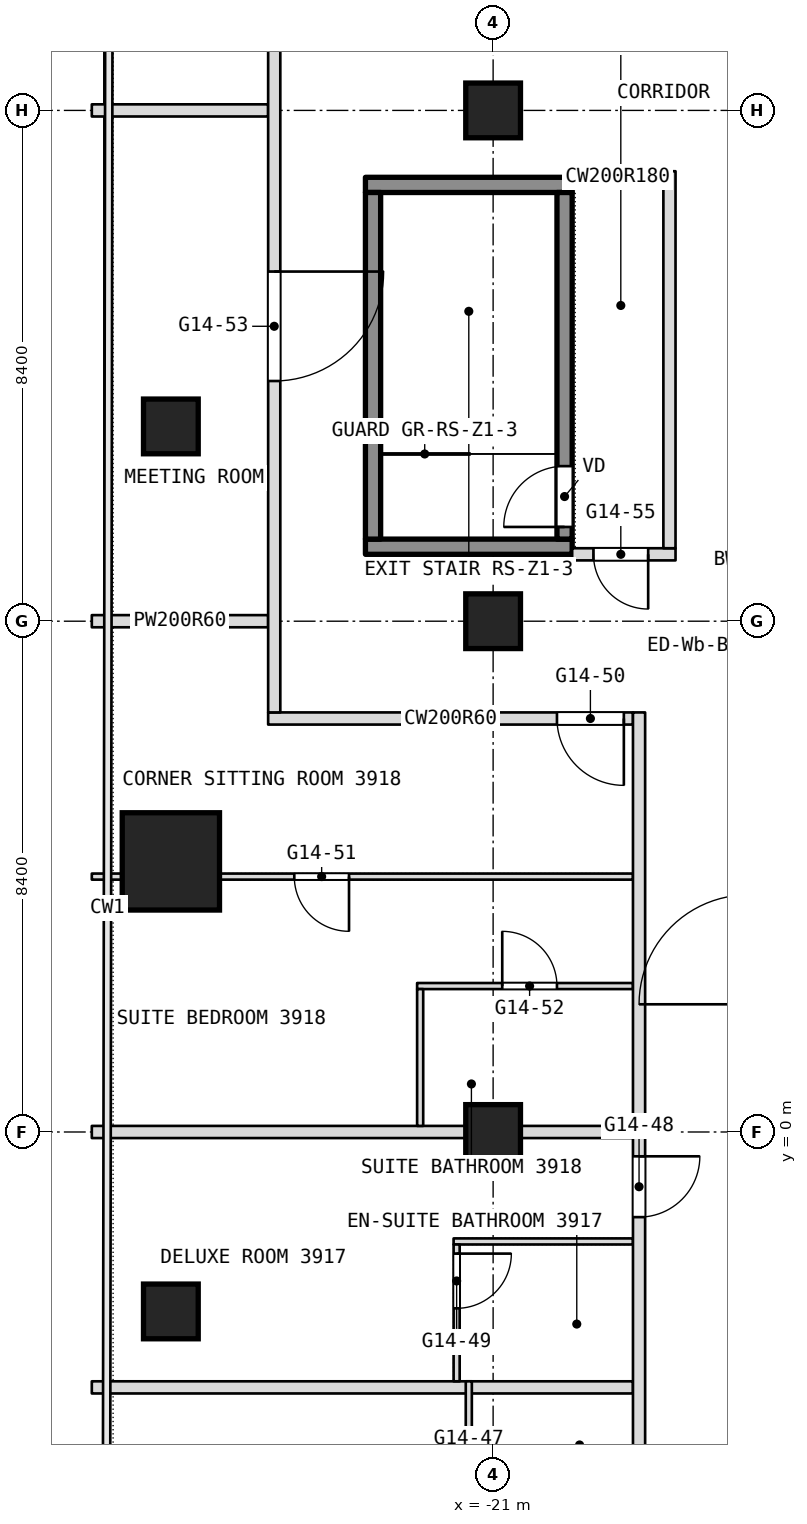
"""IFC4 building model, lengths in metres.
Left out: names, types, materials, properties, quantities, classifications, styles, units other than length and angle.
Written with IfcOpenShell. Run it as: python <this file> out.ifc"""

import sys

from ifc_helpers import new_model, si_unit, direction, frame, frame_2d, origin, origin_2d, place, context, subcontext, project, spatial, rectangle, extrude, element, fill, save


model = new_model("IFC4")
c1 = context("Model", 3, precision=1e-05, world=origin(), true_north=direction((0.0, 1.0)))
c2 = subcontext(c1, "Body", "Model", "MODEL_VIEW")
j1 = project(units=[si_unit("LENGTHUNIT", "METRE"), si_unit("PLANEANGLEUNIT", "RADIAN")], contexts=[c1])
p1 = place(None, origin())
s1 = spatial("IfcSite", under=j1, at=p1, CompositionType="ELEMENT")
p2 = place(p1, origin())
s2 = spatial("IfcBuilding", under=s1, at=p2, CompositionType="ELEMENT")
p3 = place(p2, frame((0.0, 0.0, 166.1)))
s3 = spatial("IfcBuildingStorey", under=s2, at=p3, CompositionType="ELEMENT", Elevation=166.1)
p4 = place(p3, frame((-26.3, 4.45, 0.0), z_axis=(0.0, 0.0, 1.0), x_axis=(1.0, 0.0, 0.0)))
e1 = element("IfcColumn", 1, at=p4, inside=s3, PredefinedType="COLUMN", context=c2, shape_type="SweptSolid", body=[
    extrude(rectangle(XDim=1.6, YDim=1.6, at=origin_2d()), origin(), (0.0, 0.0, 1.0), 3.6),
])
for number, where, z_axis, x_axis in (
    (2, (-21.0, 0.0, 0.0), (0.0, 0.0, 1.0), (1.0, 0.0, 0.0)),
    (3, (-21.0, 8.4, 0.0), (0.0, 0.0, 1.0), (1.0, 0.0, 0.0)),
    (4, (-21.0, 16.8, 0.0), (0.0, 0.0, 1.0), (1.0, 0.0, 0.0)),
    (5, (-26.3, -2.951, 0.0), (0.0, 0.0, 1.0), (1.0, 0.0, 0.0)),
    (6, (-26.3, 11.603, 0.0), (0.0, 0.0, 1.0), (1.0, 0.0, 0.0)),
):
    element("IfcColumn", number, at=place(p3, frame(where, z_axis=z_axis, x_axis=x_axis)), inside=s3, PredefinedType="COLUMN", context=c2, shape_type="SweptSolid", body=[
        extrude(rectangle(XDim=0.9, YDim=0.9, at=origin_2d()), origin(), (0.0, 0.0, 1.0), 3.6),
    ])
p5 = place(p3, frame((-27.6, -4.2, 0.0), z_axis=(0.0, 0.0, 1.0), x_axis=(1.0, 0.0, 0.0)))
e7 = element("IfcWall", 7, at=p5, inside=s3, PredefinedType="PARTITIONING", context=c2, shape_type="SweptSolid", body=[
    extrude(rectangle(XDim=8.9, YDim=0.2, at=frame_2d((4.45, 0.0))), origin(), (0.0, 0.0, 1.0), 3.3),
])
p6 = place(p3, frame((-21.65, -1.8, 0.0), z_axis=(0.0, 0.0, 1.0), x_axis=(1.0, 0.0, 0.0)))
e8 = element("IfcWall", 8, at=p6, inside=s3, PredefinedType="PARTITIONING", context=c2, shape_type="SweptSolid", body=[
    extrude(rectangle(XDim=2.95, YDim=0.1, at=frame_2d((1.475, 0.0))), origin(), (0.0, 0.0, 1.0), 3.3),
])
p7 = place(p3, frame((-27.6, 0.0, 0.0), z_axis=(0.0, 0.0, 1.0), x_axis=(1.0, 0.0, 0.0)))
e9 = element("IfcWall", 9, at=p7, inside=s3, PredefinedType="PARTITIONING", context=c2, shape_type="SweptSolid", body=[
    extrude(rectangle(XDim=8.9, YDim=0.2, at=frame_2d((4.45, 0.0))), origin(), (0.0, 0.0, 1.0), 2.85),
])
p8 = place(p3, frame((-22.25, 2.4, 0.0), z_axis=(0.0, 0.0, 1.0), x_axis=(1.0, 0.0, 0.0)))
e10 = element("IfcWall", 10, at=p8, inside=s3, PredefinedType="PARTITIONING", context=c2, shape_type="SweptSolid", body=[
    extrude(rectangle(XDim=3.55, YDim=0.1, at=frame_2d((1.775, 0.0))), origin(), (0.0, 0.0, 1.0), 3.3),
])
p9 = place(p8, frame((1.4, 0.0, 0.0)))
e11 = element("IfcOpeningElement", 11, at=p9, cuts=e10, PredefinedType="OPENING", context=c2, shape_type="SweptSolid", body=[
    extrude(rectangle(XDim=0.9, YDim=2.1, at=frame_2d((0.45, 1.05))), frame((0.0, 0.05, 0.0), z_axis=(0.0, -1.0, 0.0), x_axis=(1.0, 0.0, 0.0)), (0.0, 0.0, 1.0), 0.1),
])
p10 = place(p3, frame((-27.6, 4.2, 0.0), z_axis=(0.0, 0.0, 1.0), x_axis=(1.0, 0.0, 0.0)))
e12 = element("IfcWall", 12, at=p10, inside=s3, PredefinedType="PARTITIONING", context=c2, shape_type="SweptSolid", body=[
    extrude(rectangle(XDim=0.5, YDim=0.1, at=frame_2d((0.25, 0.0))), origin(), (0.0, 0.0, 1.0), 3.3),
])
p11 = place(p3, frame((-25.5, 4.2, 0.0), z_axis=(0.0, 0.0, 1.0), x_axis=(1.0, 0.0, 0.0)))
e13 = element("IfcWall", 13, at=p11, inside=s3, PredefinedType="PARTITIONING", context=c2, shape_type="SweptSolid", body=[
    extrude(rectangle(XDim=6.8, YDim=0.1, at=frame_2d((3.4, 0.0))), origin(), (0.0, 0.0, 1.0), 3.3),
])
p12 = place(p11, frame((1.23, 0.0, 0.0)))
e14 = element("IfcOpeningElement", 14, at=p12, cuts=e13, PredefinedType="OPENING", context=c2, shape_type="SweptSolid", body=[
    extrude(rectangle(XDim=0.9, YDim=2.1, at=frame_2d((0.45, 1.05))), frame((0.0, 0.05, 0.0), z_axis=(0.0, -1.0, 0.0), x_axis=(1.0, 0.0, 0.0)), (0.0, 0.0, 1.0), 0.1),
])
p13 = place(p3, frame((-24.7, 6.8, 0.0), z_axis=(0.0, 0.0, 1.0), x_axis=(1.0, 0.0, 0.0)))
e15 = element("IfcWall", 15, at=p13, inside=s3, PredefinedType="PARTITIONING", context=c2, shape_type="SweptSolid", body=[
    extrude(rectangle(XDim=6.0, YDim=0.2, at=frame_2d((3.0, 0.0))), origin(), (0.0, 0.0, 1.0), 3.3),
])
p14 = place(p13, frame((4.75, 0.0, 0.0)))
e16 = element("IfcOpeningElement", 16, at=p14, cuts=e15, PredefinedType="OPENING", context=c2, shape_type="SweptSolid", body=[
    extrude(rectangle(XDim=1.1, YDim=2.1, at=frame_2d((0.55, 1.05))), frame((0.0, 0.1, 0.0), z_axis=(0.0, -1.0, 0.0), x_axis=(1.0, 0.0, 0.0)), (0.0, 0.0, 1.0), 0.2),
])
p15 = place(p3, frame((-27.6, 8.4, 0.0), z_axis=(0.0, 0.0, 1.0), x_axis=(1.0, 0.0, 0.0)))
e17 = element("IfcWall", 17, at=p15, inside=s3, PredefinedType="PARTITIONING", context=c2, shape_type="SweptSolid", body=[
    extrude(rectangle(XDim=2.9, YDim=0.2, at=frame_2d((1.45, 0.0))), origin(), (0.0, 0.0, 1.0), 2.85),
])
p16 = place(p3, frame((-19.7, 9.5, 0.0), z_axis=(0.0, 0.0, 1.0), x_axis=(1.0, 0.0, 0.0)))
e18 = element("IfcWall", 18, at=p16, inside=s3, PredefinedType="PARTITIONING", context=c2, shape_type="SweptSolid", body=[
    extrude(rectangle(XDim=1.7, YDim=0.2, at=frame_2d((0.85, 0.0))), origin(), (0.0, 0.0, 1.0), 3.3),
])
p17 = place(p16, frame((0.35, 0.0, 0.0)))
e19 = element("IfcOpeningElement", 19, at=p17, cuts=e18, PredefinedType="OPENING", context=c2, shape_type="SweptSolid", body=[
    extrude(rectangle(XDim=0.9, YDim=2.1, at=frame_2d((0.45, 1.05))), frame((0.0, 0.1, 0.0), z_axis=(0.0, -1.0, 0.0), x_axis=(1.0, 0.0, 0.0)), (0.0, 0.0, 1.0), 0.2),
])
p18 = place(p3, frame((-19.7, 15.7, 0.0), z_axis=(0.0, 0.0, 1.0), x_axis=(1.0, 0.0, 0.0)))
e20 = element("IfcWall", 20, at=p18, inside=s3, PredefinedType="PARTITIONING", context=c2, shape_type="SweptSolid", body=[
    extrude(rectangle(XDim=1.5, YDim=0.2, at=frame_2d((0.75, 0.0))), origin(), (0.0, 0.0, 1.0), 3.3),
])
p19 = place(p3, frame((-27.6, 16.8, 0.0), z_axis=(0.0, 0.0, 1.0), x_axis=(1.0, 0.0, 0.0)))
e21 = element("IfcWall", 21, at=p19, inside=s3, PredefinedType="PARTITIONING", context=c2, shape_type="SweptSolid", body=[
    extrude(rectangle(XDim=2.9, YDim=0.2, at=frame_2d((1.45, 0.0))), origin(), (0.0, 0.0, 1.0), 2.85),
])
p20 = place(p3, frame((-18.1, 9.6, 0.0), z_axis=(0.0, 0.0, 1.0), x_axis=(0.0, 1.0, 0.0)))
e22 = element("IfcWall", 22, at=p20, inside=s3, PredefinedType="PARTITIONING", context=c2, shape_type="SweptSolid", body=[
    extrude(rectangle(XDim=6.2, YDim=0.2, at=frame_2d((3.1, 0.0))), origin(), (0.0, 0.0, 1.0), 3.3),
])
p21 = place(p3, frame((-18.6, -21.708, 0.0), z_axis=(0.0, 0.0, 1.0), x_axis=(0.0, 1.0, 0.0)))
e23 = element("IfcWall", 23, at=p21, inside=s3, PredefinedType="PARTITIONING", context=c2, shape_type="SweptSolid", body=[
    extrude(rectangle(XDim=28.608, YDim=0.2, at=frame_2d((14.304, 0.0))), origin(), (0.0, 0.0, 1.0), 3.3),
])
p22 = place(p21, frame((2.204, 0.0, 0.0)))
e24 = element("IfcOpeningElement", 24, at=p22, cuts=e23, PredefinedType="OPENING", context=c2, shape_type="SweptSolid", body=[
    extrude(rectangle(XDim=1.0, YDim=2.1, at=frame_2d((0.5, 1.05))), frame((0.0, 0.1, 0.0), z_axis=(0.0, -1.0, 0.0), x_axis=(1.0, 0.0, 0.0)), (0.0, 0.0, 1.0), 0.2),
])
p23 = place(p21, frame((8.208, 0.0, 0.0)))
e25 = element("IfcOpeningElement", 25, at=p23, cuts=e23, PredefinedType="OPENING", context=c2, shape_type="SweptSolid", body=[
    extrude(rectangle(XDim=1.8, YDim=2.1, at=frame_2d((0.9, 1.05))), frame((0.0, 0.1, 0.0), z_axis=(0.0, -1.0, 0.0), x_axis=(1.0, 0.0, 0.0)), (0.0, 0.0, 1.0), 0.2),
])
p24 = place(p21, frame((13.708, 0.0, 0.0)))
e26 = element("IfcOpeningElement", 26, at=p24, cuts=e23, PredefinedType="OPENING", context=c2, shape_type="SweptSolid", body=[
    extrude(rectangle(XDim=1.0, YDim=2.1, at=frame_2d((0.5, 1.05))), frame((0.0, 0.1, 0.0), z_axis=(0.0, -1.0, 0.0), x_axis=(1.0, 0.0, 0.0)), (0.0, 0.0, 1.0), 0.2),
])
p25 = place(p21, frame((20.308, 0.0, 0.0)))
e27 = element("IfcOpeningElement", 27, at=p25, cuts=e23, PredefinedType="OPENING", context=c2, shape_type="SweptSolid", body=[
    extrude(rectangle(XDim=1.0, YDim=2.1, at=frame_2d((0.5, 1.05))), frame((0.0, 0.1, 0.0), z_axis=(0.0, -1.0, 0.0), x_axis=(1.0, 0.0, 0.0)), (0.0, 0.0, 1.0), 0.2),
])
p26 = place(p3, frame((-21.4, -6.65, 0.0), z_axis=(0.0, 0.0, 1.0), x_axis=(0.0, 1.0, 0.0)))
e28 = element("IfcWall", 28, at=p26, inside=s3, PredefinedType="PARTITIONING", context=c2, shape_type="SweptSolid", body=[
    extrude(rectangle(XDim=2.55, YDim=0.1, at=frame_2d((1.275, 0.0))), origin(), (0.0, 0.0, 1.0), 3.3),
])
p27 = place(p26, frame((0.15, 0.0, 0.0)))
e29 = element("IfcOpeningElement", 29, at=p27, cuts=e28, PredefinedType="OPENING", context=c2, shape_type="SweptSolid", body=[
    extrude(rectangle(XDim=0.9, YDim=2.1, at=frame_2d((0.45, 1.05))), frame((0.0, 0.05, 0.0), z_axis=(0.0, -1.0, 0.0), x_axis=(1.0, 0.0, 0.0)), (0.0, 0.0, 1.0), 0.1),
])
p28 = place(p3, frame((-21.6, -4.1, 0.0), z_axis=(0.0, 0.0, 1.0), x_axis=(0.0, 1.0, 0.0)))
e30 = element("IfcWall", 30, at=p28, inside=s3, PredefinedType="PARTITIONING", context=c2, shape_type="SweptSolid", body=[
    extrude(rectangle(XDim=2.25, YDim=0.1, at=frame_2d((1.125, 0.0))), origin(), (0.0, 0.0, 1.0), 3.3),
])
p29 = place(p28, frame((1.2, 0.0, 0.0)))
e31 = element("IfcOpeningElement", 31, at=p29, cuts=e30, PredefinedType="OPENING", context=c2, shape_type="SweptSolid", body=[
    extrude(rectangle(XDim=0.9, YDim=2.1, at=frame_2d((0.45, 1.05))), frame((0.0, 0.05, 0.0), z_axis=(0.0, -1.0, 0.0), x_axis=(1.0, 0.0, 0.0)), (0.0, 0.0, 1.0), 0.1),
])
p30 = place(p3, frame((-22.2, 0.1, 0.0), z_axis=(0.0, 0.0, 1.0), x_axis=(0.0, 1.0, 0.0)))
e32 = element("IfcWall", 32, at=p30, inside=s3, PredefinedType="PARTITIONING", context=c2, shape_type="SweptSolid", body=[
    extrude(rectangle(XDim=2.25, YDim=0.1, at=frame_2d((1.125, 0.0))), origin(), (0.0, 0.0, 1.0), 3.3),
])
p31 = place(p3, frame((-24.6, 6.9, 0.0), z_axis=(0.0, 0.0, 1.0), x_axis=(0.0, 1.0, 0.0)))
e33 = element("IfcWall", 33, at=p31, inside=s3, PredefinedType="PARTITIONING", context=c2, shape_type="SweptSolid", body=[
    extrude(rectangle(XDim=11.6, YDim=0.2, at=frame_2d((5.8, 0.0))), origin(), (0.0, 0.0, 1.0), 3.3),
])
p32 = place(p31, frame((5.45, 0.0, 0.0)))
e34 = element("IfcOpeningElement", 34, at=p32, cuts=e33, PredefinedType="OPENING", context=c2, shape_type="SweptSolid", body=[
    extrude(rectangle(XDim=1.8, YDim=2.1, at=frame_2d((0.9, 1.05))), frame((0.0, 0.1, 0.0), z_axis=(0.0, -1.0, 0.0), x_axis=(1.0, 0.0, 0.0)), (0.0, 0.0, 1.0), 0.2),
])
for number, where, z_axis, x_axis in (
    (35, (-23.1, 9.625, 0.1), (0.0, 0.0, 1.0), (1.0, 0.0, 0.0)),
    (36, (-23.1, 15.575, 0.1), (0.0, 0.0, 1.0), (1.0, 0.0, 0.0)),
):
    element("IfcWall", number, at=place(p3, frame(where, z_axis=z_axis, x_axis=x_axis)), inside=s3, PredefinedType="SHEAR", context=c2, shape_type="SweptSolid", body=[
        extrude(rectangle(XDim=3.4, YDim=0.25, at=frame_2d((1.7, 0.0))), origin(), (0.0, 0.0, 1.0), 3.2),
    ])
p33 = place(p3, frame((-22.975, 9.75, 0.1), z_axis=(0.0, 0.0, 1.0), x_axis=(0.0, 1.0, 0.0)))
e37 = element("IfcWall", 37, at=p33, inside=s3, PredefinedType="SHEAR", context=c2, shape_type="SweptSolid", body=[
    extrude(rectangle(XDim=5.7, YDim=0.25, at=frame_2d((2.85, 0.0))), origin(), (0.0, 0.0, 1.0), 3.2),
])
p34 = place(p3, frame((-19.825, 9.75, 0.1), z_axis=(0.0, 0.0, 1.0), x_axis=(0.0, 1.0, 0.0)))
e38 = element("IfcWall", 38, at=p34, inside=s3, PredefinedType="SHEAR", context=c2, shape_type="SweptSolid", body=[
    extrude(rectangle(XDim=5.7, YDim=0.25, at=frame_2d((2.85, 0.0))), origin(), (0.0, 0.0, 1.0), 3.2),
])
p35 = place(p34, frame((0.2, 0.0, 0.0)))
e39 = element("IfcOpeningElement", 39, at=p35, cuts=e38, PredefinedType="OPENING", context=c2, shape_type="SweptSolid", body=[
    extrude(rectangle(XDim=1.0, YDim=2.1, at=frame_2d((0.5, 1.05))), frame((0.0, 0.125, 0.0), z_axis=(0.0, -1.0, 0.0), x_axis=(1.0, 0.0, 0.0)), (0.0, 0.0, 1.0), 0.25),
])
p36 = place(p9, origin())
e40 = element("IfcDoor", 40, at=p36, inside=s3, OperationType="SINGLE_SWING_LEFT", PredefinedType="DOOR", context=c2, shape_type="SweptSolid", body=[
    extrude(rectangle(XDim=0.9, YDim=2.1, at=frame_2d((0.45, 1.05))), frame((0.0, 0.025, 0.0), z_axis=(0.0, -1.0, 0.0), x_axis=(1.0, 0.0, 0.0)), (0.0, 0.0, 1.0), 0.05),
])
fill(e11, e40)
p37 = place(p12, origin())
e41 = element("IfcDoor", 41, at=p37, inside=s3, OperationType="SINGLE_SWING_RIGHT", PredefinedType="DOOR", context=c2, shape_type="SweptSolid", body=[
    extrude(rectangle(XDim=0.9, YDim=2.1, at=frame_2d((0.45, 1.05))), frame((0.0, 0.025, 0.0), z_axis=(0.0, -1.0, 0.0), x_axis=(1.0, 0.0, 0.0)), (0.0, 0.0, 1.0), 0.05),
])
fill(e14, e41)
p38 = place(p14, origin())
e42 = element("IfcDoor", 42, at=p38, inside=s3, OperationType="SINGLE_SWING_LEFT", PredefinedType="DOOR", context=c2, shape_type="SweptSolid", body=[
    extrude(rectangle(XDim=1.1, YDim=2.1, at=frame_2d((0.55, 1.05))), frame((0.0, 0.025, 0.0), z_axis=(0.0, -1.0, 0.0), x_axis=(1.0, 0.0, 0.0)), (0.0, 0.0, 1.0), 0.05),
])
fill(e16, e42)
p39 = place(p17, origin())
e43 = element("IfcDoor", 43, at=p39, inside=s3, OperationType="SINGLE_SWING_RIGHT", PredefinedType="DOOR", context=c2, shape_type="SweptSolid", body=[
    extrude(rectangle(XDim=0.9, YDim=2.1, at=frame_2d((0.45, 1.05))), frame((0.0, 0.025, 0.0), z_axis=(0.0, -1.0, 0.0), x_axis=(1.0, 0.0, 0.0)), (0.0, 0.0, 1.0), 0.05),
])
fill(e19, e43)
p40 = place(p25, origin())
e44 = element("IfcDoor", 44, at=p40, inside=s3, OperationType="SINGLE_SWING_LEFT", PredefinedType="DOOR", context=c2, shape_type="SweptSolid", body=[
    extrude(rectangle(XDim=1.0, YDim=2.1, at=frame_2d((0.5, 1.05))), frame((0.0, 0.025, 0.0), z_axis=(0.0, -1.0, 0.0), x_axis=(1.0, 0.0, 0.0)), (0.0, 0.0, 1.0), 0.05),
])
fill(e27, e44)
p41 = place(p29, origin())
e45 = element("IfcDoor", 45, at=p41, inside=s3, OperationType="SINGLE_SWING_LEFT", PredefinedType="DOOR", context=c2, shape_type="SweptSolid", body=[
    extrude(rectangle(XDim=0.9, YDim=2.1, at=frame_2d((0.45, 1.05))), frame((0.0, 0.025, 0.0), z_axis=(0.0, -1.0, 0.0), x_axis=(1.0, 0.0, 0.0)), (0.0, 0.0, 1.0), 0.05),
])
fill(e31, e45)
p42 = place(p32, origin())
e46 = element("IfcDoor", 46, at=p42, inside=s3, OperationType="DOUBLE_DOOR_SINGLE_SWING", PredefinedType="DOOR", context=c2, shape_type="SweptSolid", body=[
    extrude(rectangle(XDim=1.8, YDim=2.1, at=frame_2d((0.9, 1.05))), frame((0.0, 0.025, 0.0), z_axis=(0.0, -1.0, 0.0), x_axis=(1.0, 0.0, 0.0)), (0.0, 0.0, 1.0), 0.05),
])
fill(e34, e46)
p43 = place(p35, origin())
e47 = element("IfcDoor", 47, at=p43, inside=s3, OperationType="SINGLE_SWING_LEFT", PredefinedType="DOOR", context=c2, shape_type="SweptSolid", body=[
    extrude(rectangle(XDim=1.0, YDim=2.1, at=frame_2d((0.5, 1.05))), frame((0.0, 0.025, 0.0), z_axis=(0.0, -1.0, 0.0), x_axis=(1.0, 0.0, 0.0)), (0.0, 0.0, 1.0), 0.05),
])
fill(e39, e47)
save(model, sys.argv[1])
